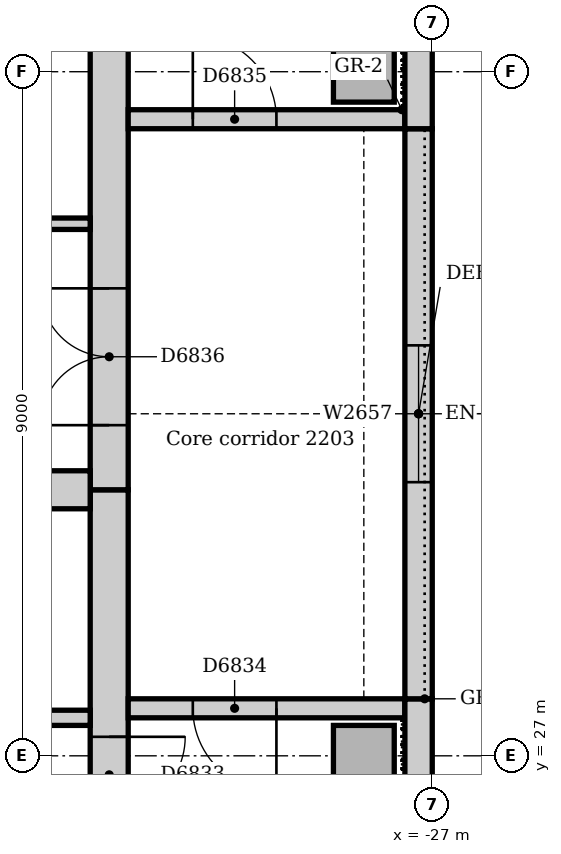
"""IFC4 building model, lengths in metres.
Left out: names, types, materials, properties, quantities, classifications, styles, units other than length and angle.
Written with IfcOpenShell. Run it as: python <this file> out.ifc"""

import sys

from ifc_helpers import new_model, si_unit, direction, frame, frame_2d, origin, origin_2d, place, context, subcontext, project, spatial, rectangle, extrude, element, fill, save


model = new_model("IFC4")
c1 = context("Model", 3, precision=1e-05, world=origin(), true_north=direction((0.0, 1.0)))
c2 = subcontext(c1, "Body", "Model", "MODEL_VIEW")
j1 = project(units=[si_unit("LENGTHUNIT", "METRE"), si_unit("PLANEANGLEUNIT", "RADIAN")], contexts=[c1])
p1 = place(None, origin())
s1 = spatial("IfcSite", under=j1, at=p1, CompositionType="ELEMENT")
p2 = place(p1, origin())
s2 = spatial("IfcBuilding", under=s1, at=p2, CompositionType="ELEMENT")
p3 = place(p2, frame((0.0, 0.0, 95.0)))
s3 = spatial("IfcBuildingStorey", under=s2, at=p3, CompositionType="ELEMENT", Elevation=95.0)
p4 = place(p3, frame((-31.25, 21.0, 0.0), z_axis=(0.0, 0.0, 1.0), x_axis=(0.0, 1.0, 0.0)))
e1 = element("IfcWall", 1, at=p4, inside=s3, PredefinedType="SOLIDWALL", context=c2, shape_type="SweptSolid", body=[
    extrude(rectangle(XDim=9.5, YDim=0.5, at=frame_2d((4.75, 0.0))), origin(), (0.0, 0.0, 1.0), 5.0),
])
p5 = place(p4, frame((5.25, 0.0, 0.0)))
e2 = element("IfcOpeningElement", 2, at=p5, cuts=e1, PredefinedType="OPENING", context=c2, shape_type="SweptSolid", body=[
    extrude(rectangle(XDim=1.0, YDim=2.1, at=frame_2d((0.5, 1.05))), frame((0.0, 0.26, 0.0), z_axis=(0.0, -1.0, 0.0), x_axis=(1.0, 0.0, 0.0)), (0.0, 0.0, 1.0), 0.52),
])
p6 = place(p3, frame((-31.25, 30.5, 0.0), z_axis=(0.0, 0.0, 1.0), x_axis=(0.0, 1.0, 0.0)))
e3 = element("IfcWall", 3, at=p6, inside=s3, PredefinedType="SOLIDWALL", context=c2, shape_type="SweptSolid", body=[
    extrude(rectangle(XDim=11.5, YDim=0.5, at=frame_2d((5.75, 0.0))), origin(), (0.0, 0.0, 1.0), 5.0),
])
p7 = place(p6, frame((0.85, 0.0, 0.0)))
e4 = element("IfcOpeningElement", 4, at=p7, cuts=e3, PredefinedType="OPENING", context=c2, shape_type="SweptSolid", body=[
    extrude(rectangle(XDim=1.8, YDim=2.1, at=frame_2d((0.9, 1.05))), frame((0.0, 0.26, 0.0), z_axis=(0.0, -1.0, 0.0), x_axis=(1.0, 0.0, 0.0)), (0.0, 0.0, 1.0), 0.52),
])
p8 = place(p3, frame((-42.0, 30.5, 0.0), z_axis=(0.0, 0.0, 1.0), x_axis=(1.0, 0.0, 0.0)))
e5 = element("IfcWall", 5, at=p8, inside=s3, PredefinedType="SOLIDWALL", context=c2, shape_type="SweptSolid", body=[
    extrude(rectangle(XDim=10.5, YDim=0.5, at=frame_2d((5.25, 0.0))), origin(), (0.0, 0.0, 1.0), 5.0),
])
p9 = place(p3, frame((-27.36, 27.625, 0.0), z_axis=(0.0, 0.0, 1.0), x_axis=(-1.0, 0.0, 0.0)))
e6 = element("IfcWall", 6, at=p9, inside=s3, PredefinedType="SOLIDWALL", context=c2, shape_type="SweptSolid", body=[
    extrude(rectangle(XDim=3.64, YDim=0.25, at=frame_2d((1.82, 0.0))), origin(), (0.0, 0.0, 1.0), 5.0),
])
p10 = place(p9, frame((1.69, 0.0, 0.0)))
e7 = element("IfcOpeningElement", 7, at=p10, cuts=e6, PredefinedType="OPENING", context=c2, shape_type="SweptSolid", body=[
    extrude(rectangle(XDim=1.1, YDim=2.1, at=frame_2d((0.55, 1.05))), frame((0.0, 0.135, 0.0), z_axis=(0.0, -1.0, 0.0), x_axis=(1.0, 0.0, 0.0)), (0.0, 0.0, 1.0), 0.27),
])
p11 = place(p3, frame((-31.0, 35.375, 0.0), z_axis=(0.0, 0.0, 1.0), x_axis=(1.0, 0.0, 0.0)))
e8 = element("IfcWall", 8, at=p11, inside=s3, PredefinedType="SOLIDWALL", context=c2, shape_type="SweptSolid", body=[
    extrude(rectangle(XDim=3.64, YDim=0.25, at=frame_2d((1.82, 0.0))), origin(), (0.0, 0.0, 1.0), 5.0),
])
p12 = place(p11, frame((0.85, 0.0, 0.0)))
e9 = element("IfcOpeningElement", 9, at=p12, cuts=e8, PredefinedType="OPENING", context=c2, shape_type="SweptSolid", body=[
    extrude(rectangle(XDim=1.1, YDim=2.1, at=frame_2d((0.55, 1.05))), frame((0.0, 0.135, 0.0), z_axis=(0.0, -1.0, 0.0), x_axis=(1.0, 0.0, 0.0)), (0.0, 0.0, 1.0), 0.27),
])
for number, where, z_axis, x_axis in (
    (10, (-27.9, 27.0, 0.0), (0.0, 0.0, 1.0), (1.0, 0.0, 0.0)),
    (11, (-27.9, 36.0, 0.0), (0.0, 0.0, 1.0), (1.0, 0.0, 0.0)),
):
    element("IfcColumn", number, at=place(p3, frame(where, z_axis=z_axis, x_axis=x_axis)), inside=s3, PredefinedType="COLUMN", context=c2, shape_type="SweptSolid", body=[
        extrude(rectangle(XDim=0.8, YDim=0.8, at=origin_2d()), origin(), (0.0, 0.0, 1.0), 5.0),
    ])
p13 = place(p3, frame((-27.18, 21.0, 0.0), z_axis=(0.0, 0.0, 1.0), x_axis=(0.0, 1.0, 0.0)))
e12 = element("IfcWall", 12, at=p13, inside=s3, PredefinedType="STANDARD", context=c2, shape_type="SweptSolid", body=[
    extrude(rectangle(XDim=6.75, YDim=0.36, at=frame_2d((3.375, 0.0))), origin(), (0.0, 0.0, 1.0), 4.85),
])
p14 = place(p3, frame((-27.18, 27.75, 0.0), z_axis=(0.0, 0.0, 1.0), x_axis=(0.0, 1.0, 0.0)))
e13 = element("IfcWall", 13, at=p14, inside=s3, PredefinedType="STANDARD", context=c2, shape_type="SweptSolid", body=[
    extrude(rectangle(XDim=7.5, YDim=0.36, at=frame_2d((3.75, 0.0))), origin(), (0.0, 0.0, 1.0), 4.85),
])
p15 = place(p14, frame((2.85, 0.0, 1.2)))
e14 = element("IfcOpeningElement", 14, at=p15, cuts=e13, PredefinedType="OPENING", context=c2, shape_type="SweptSolid", body=[
    extrude(rectangle(XDim=1.8, YDim=1.2, at=frame_2d((0.9, 0.6))), frame((0.0, 0.19, 0.0), z_axis=(0.0, -1.0, 0.0), x_axis=(1.0, 0.0, 0.0)), (0.0, 0.0, 1.0), 0.38),
])
p16 = place(p3, frame((-27.18, 35.25, 0.0), z_axis=(0.0, 0.0, 1.0), x_axis=(0.0, 1.0, 0.0)))
e15 = element("IfcWall", 15, at=p16, inside=s3, PredefinedType="STANDARD", context=c2, shape_type="SweptSolid", body=[
    extrude(rectangle(XDim=6.75, YDim=0.36, at=frame_2d((3.375, 0.0))), origin(), (0.0, 0.0, 1.0), 4.85),
])
p17 = place(p3, frame((-34.9, 27.5, 0.0), z_axis=(0.0, 0.0, 1.0), x_axis=(1.0, 0.0, 0.0)))
e16 = element("IfcWall", 16, at=p17, inside=s3, PredefinedType="SOLIDWALL", context=c2, shape_type="SweptSolid", body=[
    extrude(rectangle(XDim=3.4, YDim=0.2, at=frame_2d((1.7, 0.0))), origin(), (0.0, 0.0, 1.0), 5.0),
])
p18 = place(p17, frame((1.1, 0.0, 0.0)))
e17 = element("IfcOpeningElement", 17, at=p18, cuts=e16, PredefinedType="OPENING", context=c2, shape_type="SweptSolid", body=[
    extrude(rectangle(XDim=1.1, YDim=2.1, at=frame_2d((0.55, 1.05))), frame((0.0, 0.11, 0.0), z_axis=(0.0, -1.0, 0.0), x_axis=(1.0, 0.0, 0.0)), (0.0, 0.0, 1.0), 0.22),
])
p19 = place(p3, frame((-34.075, 34.0, 0.0), z_axis=(0.0, 0.0, 1.0), x_axis=(1.0, 0.0, 0.0)))
e18 = element("IfcWall", 18, at=p19, inside=s3, PredefinedType="SOLIDWALL", context=c2, shape_type="SweptSolid", body=[
    extrude(rectangle(XDim=2.575, YDim=0.15, at=frame_2d((1.288, 0.0))), origin(), (0.0, 0.0, 1.0), 5.0),
])
p20 = place(p15, origin())
e19 = element("IfcWindow", 19, at=p20, inside=s3, PartitioningType="SINGLE_PANEL", PredefinedType="WINDOW", context=c2, shape_type="SweptSolid", body=[
    extrude(rectangle(XDim=1.8, YDim=1.2, at=frame_2d((0.9, 0.6))), frame((0.0, 0.13, 0.0), z_axis=(0.0, -1.0, 0.0), x_axis=(1.0, 0.0, 0.0)), (0.0, 0.0, 1.0), 0.06),
])
fill(e14, e19)
p21 = place(p5, frame((1.0, 0.0, 0.0), z_axis=(0.0, 0.0, 1.0), x_axis=(-1.0, 0.0, 0.0)))
e20 = element("IfcDoor", 20, at=p21, inside=s3, OperationType="SINGLE_SWING_LEFT", PredefinedType="DOOR", context=c2, shape_type="SweptSolid", body=[
    extrude(rectangle(XDim=1.0, YDim=2.1, at=frame_2d((0.5, 1.05))), frame((0.0, 0.025, 0.0), z_axis=(0.0, -1.0, 0.0), x_axis=(1.0, 0.0, 0.0)), (0.0, 0.0, 1.0), 0.05),
])
fill(e2, e20)
p22 = place(p10, origin())
e21 = element("IfcDoor", 21, at=p22, inside=s3, OperationType="SINGLE_SWING_LEFT", PredefinedType="DOOR", context=c2, shape_type="SweptSolid", body=[
    extrude(rectangle(XDim=1.1, YDim=2.1, at=frame_2d((0.55, 1.05))), frame((0.0, 0.025, 0.0), z_axis=(0.0, -1.0, 0.0), x_axis=(1.0, 0.0, 0.0)), (0.0, 0.0, 1.0), 0.05),
])
fill(e7, e21)
p23 = place(p12, origin())
e22 = element("IfcDoor", 22, at=p23, inside=s3, OperationType="SINGLE_SWING_LEFT", PredefinedType="DOOR", context=c2, shape_type="SweptSolid", body=[
    extrude(rectangle(XDim=1.1, YDim=2.1, at=frame_2d((0.55, 1.05))), frame((0.0, 0.025, 0.0), z_axis=(0.0, -1.0, 0.0), x_axis=(1.0, 0.0, 0.0)), (0.0, 0.0, 1.0), 0.05),
])
fill(e9, e22)
p24 = place(p7, origin())
e23 = element("IfcDoor", 23, at=p24, inside=s3, OperationType="DOUBLE_DOOR_SINGLE_SWING", PredefinedType="DOOR", context=c2, shape_type="SweptSolid", body=[
    extrude(rectangle(XDim=1.8, YDim=2.1, at=frame_2d((0.9, 1.05))), frame((0.0, 0.025, 0.0), z_axis=(0.0, -1.0, 0.0), x_axis=(1.0, 0.0, 0.0)), (0.0, 0.0, 1.0), 0.05),
])
fill(e4, e23)
save(model, sys.argv[1])
